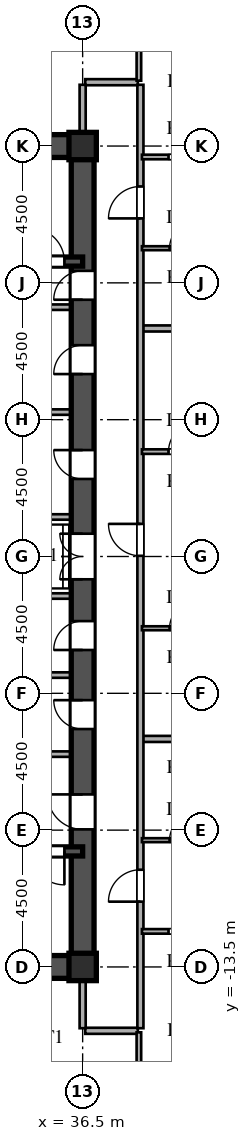
"""IFC4 building model, lengths in metres.
Left out: names, types, materials, properties, quantities, classifications, styles, units other than length and angle.
Written with IfcOpenShell. Run it as: python <this file> out.ifc"""

import sys

from ifc_helpers import new_model, si_unit, direction, frame, frame_2d, origin, origin_2d, place, context, subcontext, project, spatial, rectangle, i_section, extrude, source, transform, mapped, element, fill, save


model = new_model("IFC4")
c1 = context("Model", 3, precision=1e-05, world=origin(), true_north=direction((0.0, 1.0)))
c2 = subcontext(c1, "Body", "Model", "MODEL_VIEW")
j1 = project(units=[si_unit("LENGTHUNIT", "METRE"), si_unit("PLANEANGLEUNIT", "RADIAN")], contexts=[c1])
p1 = place(None, origin())
s1 = spatial("IfcSite", under=j1, at=p1, CompositionType="ELEMENT")
p2 = place(p1, origin())
s2 = spatial("IfcBuilding", under=s1, at=p2, CompositionType="ELEMENT")
p3 = place(p2, frame((0.0, 0.0, 29.7)))
s3 = spatial("IfcBuildingStorey", under=s2, at=p3, CompositionType="ELEMENT", Elevation=29.7)
m1 = source(origin(), c2, "Body", "SweptSolid", [
    extrude(i_section(OverallWidth=0.9, OverallDepth=0.9, WebThickness=0.036, FlangeThickness=0.055, at=origin_2d()), origin(), (0.0, 0.0, 1.0), 3.6),
])
for number, where, z_axis, x_axis in (
    (1, (36.5, -13.5, 0.0), (0.0, 0.0, 1.0), (1.0, 0.0, 0.0)),
    (2, (36.5, 13.5, 0.0), (0.0, 0.0, 1.0), (1.0, 0.0, 0.0)),
):
    element("IfcColumn", number, at=place(p3, frame(where, z_axis=z_axis, x_axis=x_axis)), inside=s3, PredefinedType="COLUMN", context=c2, shape_type="MappedRepresentation", body=[
        mapped(m1, transform((0.0, 0.0, 0.0), scale=1.0)),
    ])
for number, where, z_axis, x_axis in (
    (3, (27.5, -13.5, 0.0), (0.0, 0.0, 1.0), (1.0, 0.0, 0.0)),
    (4, (27.5, 13.5, 0.0), (0.0, 0.0, 1.0), (1.0, 0.0, 0.0)),
):
    element("IfcWall", number, at=place(p3, frame(where, z_axis=z_axis, x_axis=x_axis)), inside=s3, PredefinedType="SHEAR", context=c2, shape_type="SweptSolid", body=[
        extrude(rectangle(XDim=9.0, YDim=0.75, at=frame_2d((4.5, 0.0))), origin(), (0.0, 0.0, 1.0), 3.38),
    ])
p4 = place(p3, frame((36.5, -13.65, 0.0), z_axis=(0.0, 0.0, 1.0), x_axis=(0.0, 1.0, 0.0)))
e5 = element("IfcWall", 5, at=p4, inside=s3, PredefinedType="SHEAR", context=c2, shape_type="SweptSolid", body=[
    extrude(rectangle(XDim=7.15, YDim=0.75, at=frame_2d((3.575, 0.0))), origin(), (0.0, 0.0, 1.0), 3.38),
])
p5 = place(p4, frame((4.675, 0.0, 0.0)))
e6 = element("IfcOpeningElement", 6, at=p5, cuts=e5, PredefinedType="OPENING", context=c2, shape_type="SweptSolid", body=[
    extrude(rectangle(XDim=1.15, YDim=2.2, at=frame_2d((0.575, 1.1))), frame((0.0, 0.385, 0.0), z_axis=(0.0, -1.0, 0.0), x_axis=(1.0, 0.0, 0.0)), (0.0, 0.0, 1.0), 0.77),
])
p6 = place(p3, frame((36.5, -1.3, 0.0), z_axis=(0.0, 0.0, 1.0), x_axis=(0.0, 1.0, 0.0)))
e7 = element("IfcWall", 7, at=p6, inside=s3, PredefinedType="SHEAR", context=c2, shape_type="SweptSolid", body=[
    extrude(rectangle(XDim=2.6, YDim=0.75, at=frame_2d((1.3, 0.0))), origin(), (0.0, 0.0, 1.0), 3.38),
])
p7 = place(p6, frame((0.55, 0.0, 0.0)))
e8 = element("IfcOpeningElement", 8, at=p7, cuts=e7, PredefinedType="OPENING", context=c2, shape_type="SweptSolid", body=[
    extrude(rectangle(XDim=1.5, YDim=2.3, at=frame_2d((0.75, 1.15))), frame((0.0, 0.385, 0.0), z_axis=(0.0, -1.0, 0.0), x_axis=(1.0, 0.0, 0.0)), (0.0, 0.0, 1.0), 0.77),
])
p8 = place(p3, frame((36.5, 8.2, 0.0), z_axis=(0.0, 0.0, 1.0), x_axis=(0.0, 1.0, 0.0)))
e9 = element("IfcWall", 9, at=p8, inside=s3, PredefinedType="SHEAR", context=c2, shape_type="SweptSolid", body=[
    extrude(rectangle(XDim=5.45, YDim=0.75, at=frame_2d((2.725, 0.0))), origin(), (0.0, 0.0, 1.0), 3.38),
])
p9 = place(p8, frame((0.245, 0.0, 0.0)))
e10 = element("IfcOpeningElement", 10, at=p9, cuts=e9, PredefinedType="OPENING", context=c2, shape_type="SweptSolid", body=[
    extrude(rectangle(XDim=0.95, YDim=2.15, at=frame_2d((0.475, 1.075))), frame((0.0, 0.385, 0.0), z_axis=(0.0, -1.0, 0.0), x_axis=(1.0, 0.0, 0.0)), (0.0, 0.0, 1.0), 0.77),
])
p10 = place(p3, frame((36.5, -6.5, 0.0), z_axis=(0.0, 0.0, 1.0), x_axis=(0.0, 1.0, 0.0)))
e11 = element("IfcWall", 11, at=p10, inside=s3, PredefinedType="SHEAR", context=c2, shape_type="SweptSolid", body=[
    extrude(rectangle(XDim=2.6, YDim=0.75, at=frame_2d((1.3, 0.0))), origin(), (0.0, 0.0, 1.0), 3.38),
])
p11 = place(p10, frame((0.825, 0.0, 0.0)))
e12 = element("IfcOpeningElement", 12, at=p11, cuts=e11, PredefinedType="OPENING", context=c2, shape_type="SweptSolid", body=[
    extrude(rectangle(XDim=0.95, YDim=2.15, at=frame_2d((0.475, 1.075))), frame((0.0, 0.385, 0.0), z_axis=(0.0, -1.0, 0.0), x_axis=(1.0, 0.0, 0.0)), (0.0, 0.0, 1.0), 0.77),
])
p12 = place(p3, frame((36.5, -3.9, 0.0), z_axis=(0.0, 0.0, 1.0), x_axis=(0.0, 1.0, 0.0)))
e13 = element("IfcWall", 13, at=p12, inside=s3, PredefinedType="SHEAR", context=c2, shape_type="SweptSolid", body=[
    extrude(rectangle(XDim=2.6, YDim=0.75, at=frame_2d((1.3, 0.0))), origin(), (0.0, 0.0, 1.0), 3.38),
])
p13 = place(p12, frame((0.825, 0.0, 0.0)))
e14 = element("IfcOpeningElement", 14, at=p13, cuts=e13, PredefinedType="OPENING", context=c2, shape_type="SweptSolid", body=[
    extrude(rectangle(XDim=0.95, YDim=2.15, at=frame_2d((0.475, 1.075))), frame((0.0, 0.385, 0.0), z_axis=(0.0, -1.0, 0.0), x_axis=(1.0, 0.0, 0.0)), (0.0, 0.0, 1.0), 0.77),
])
p14 = place(p3, frame((36.5, 1.3, 0.0), z_axis=(0.0, 0.0, 1.0), x_axis=(0.0, 1.0, 0.0)))
e15 = element("IfcWall", 15, at=p14, inside=s3, PredefinedType="SHEAR", context=c2, shape_type="SweptSolid", body=[
    extrude(rectangle(XDim=3.45, YDim=0.75, at=frame_2d((1.725, 0.0))), origin(), (0.0, 0.0, 1.0), 3.38),
])
p15 = place(p14, frame((1.25, 0.0, 0.0)))
e16 = element("IfcOpeningElement", 16, at=p15, cuts=e15, PredefinedType="OPENING", context=c2, shape_type="SweptSolid", body=[
    extrude(rectangle(XDim=0.95, YDim=2.15, at=frame_2d((0.475, 1.075))), frame((0.0, 0.385, 0.0), z_axis=(0.0, -1.0, 0.0), x_axis=(1.0, 0.0, 0.0)), (0.0, 0.0, 1.0), 0.77),
])
p16 = place(p3, frame((36.5, 4.75, 0.0), z_axis=(0.0, 0.0, 1.0), x_axis=(0.0, 1.0, 0.0)))
e17 = element("IfcWall", 17, at=p16, inside=s3, PredefinedType="SHEAR", context=c2, shape_type="SweptSolid", body=[
    extrude(rectangle(XDim=3.45, YDim=0.75, at=frame_2d((1.725, 0.0))), origin(), (0.0, 0.0, 1.0), 3.38),
])
p17 = place(p16, frame((1.25, 0.0, 0.0)))
e18 = element("IfcOpeningElement", 18, at=p17, cuts=e17, PredefinedType="OPENING", context=c2, shape_type="SweptSolid", body=[
    extrude(rectangle(XDim=0.95, YDim=2.15, at=frame_2d((0.475, 1.075))), frame((0.0, 0.385, 0.0), z_axis=(0.0, -1.0, 0.0), x_axis=(1.0, 0.0, 0.0)), (0.0, 0.0, 1.0), 0.77),
])
p18 = place(p3, frame((27.5, -9.7, 0.0), z_axis=(0.0, 0.0, 1.0), x_axis=(1.0, 0.0, 0.0)))
e19 = element("IfcWall", 19, at=p18, inside=s3, PredefinedType="SHEAR", context=c2, shape_type="SweptSolid", body=[
    extrude(rectangle(XDim=9.0, YDim=0.3, at=frame_2d((4.5, 0.0))), origin(), (0.0, 0.0, 1.0), 3.38),
])
p19 = place(p18, frame((7.3, 0.0, 0.0)))
e20 = element("IfcOpeningElement", 20, at=p19, cuts=e19, PredefinedType="OPENING", context=c2, shape_type="SweptSolid", body=[
    extrude(rectangle(XDim=1.1, YDim=2.2, at=frame_2d((0.55, 1.1))), frame((0.0, 0.16, 0.0), z_axis=(0.0, -1.0, 0.0), x_axis=(1.0, 0.0, 0.0)), (0.0, 0.0, 1.0), 0.32),
])
p20 = place(p3, frame((27.5, 9.7, 0.0), z_axis=(0.0, 0.0, 1.0), x_axis=(1.0, 0.0, 0.0)))
e21 = element("IfcWall", 21, at=p20, inside=s3, PredefinedType="SHEAR", context=c2, shape_type="SweptSolid", body=[
    extrude(rectangle(XDim=9.0, YDim=0.3, at=frame_2d((4.5, 0.0))), origin(), (0.0, 0.0, 1.0), 3.38),
])
p21 = place(p20, frame((7.3, 0.0, 0.0)))
e22 = element("IfcOpeningElement", 22, at=p21, cuts=e21, PredefinedType="OPENING", context=c2, shape_type="SweptSolid", body=[
    extrude(rectangle(XDim=1.1, YDim=2.2, at=frame_2d((0.55, 1.1))), frame((0.0, 0.16, 0.0), z_axis=(0.0, -1.0, 0.0), x_axis=(1.0, 0.0, 0.0)), (0.0, 0.0, 1.0), 0.32),
])
for number, where, z_axis, x_axis in (
    (23, (30.45, -6.5, 0.0), (0.0, 0.0, 1.0), (1.0, 0.0, 0.0)),
    (24, (30.45, 8.2, 0.0), (0.0, 0.0, 1.0), (1.0, 0.0, 0.0)),
):
    element("IfcWall", number, at=place(p3, frame(where, z_axis=z_axis, x_axis=x_axis)), inside=s3, PredefinedType="PARTITIONING", context=c2, shape_type="SweptSolid", body=[
        extrude(rectangle(XDim=5.7, YDim=0.18, at=frame_2d((2.85, 0.0))), origin(), (0.0, 0.0, 1.0), 3.38),
    ])
for number, where, z_axis, x_axis in (
    (25, (33.2, -1.3, 0.0), (0.0, 0.0, 1.0), (1.0, 0.0, 0.0)),
    (26, (33.2, 1.3, 0.0), (0.0, 0.0, 1.0), (1.0, 0.0, 0.0)),
    (27, (33.2, -3.9, 0.0), (0.0, 0.0, 1.0), (1.0, 0.0, 0.0)),
    (28, (33.2, 4.75, 0.0), (0.0, 0.0, 1.0), (1.0, 0.0, 0.0)),
):
    element("IfcWall", number, at=place(p3, frame(where, z_axis=z_axis, x_axis=x_axis)), inside=s3, PredefinedType="PARTITIONING", context=c2, shape_type="SweptSolid", body=[
        extrude(rectangle(XDim=2.95, YDim=0.18, at=frame_2d((1.475, 0.0))), origin(), (0.0, 0.0, 1.0), 3.38),
    ])
p22 = place(p3, frame((36.585, -15.6, 0.0), z_axis=(0.0, 0.0, 1.0), x_axis=(1.0, 0.0, 0.0)))
e29 = element("IfcWall", 29, at=p22, inside=s3, PredefinedType="PARTITIONING", context=c2, shape_type="SweptSolid", body=[
    extrude(rectangle(XDim=1.73, YDim=0.2, at=frame_2d((0.865, 0.0))), origin(), (0.0, 0.0, 1.0), 3.38),
])
p23 = place(p3, frame((38.45, -12.33, 0.0), z_axis=(0.0, 0.0, 1.0), x_axis=(1.0, 0.0, 0.0)))
e30 = element("IfcWall", 30, at=p23, inside=s3, PredefinedType="PARTITIONING", context=c2, shape_type="SweptSolid", body=[
    extrude(rectangle(XDim=2.7, YDim=0.15, at=frame_2d((1.35, 0.0))), origin(), (0.0, 0.0, 1.0), 3.38),
])
p24 = place(p23, frame((0.875, 0.0, 0.0)))
e31 = element("IfcOpeningElement", 31, at=p24, cuts=e30, PredefinedType="OPENING", context=c2, shape_type="SweptSolid", body=[
    extrude(rectangle(XDim=0.95, YDim=2.15, at=frame_2d((0.475, 1.075))), frame((0.0, 0.085, 0.0), z_axis=(0.0, -1.0, 0.0), x_axis=(1.0, 0.0, 0.0)), (0.0, 0.0, 1.0), 0.17),
])
p25 = place(p3, frame((38.45, -9.33, 0.0), z_axis=(0.0, 0.0, 1.0), x_axis=(1.0, 0.0, 0.0)))
e32 = element("IfcWall", 32, at=p25, inside=s3, PredefinedType="PARTITIONING", context=c2, shape_type="SweptSolid", body=[
    extrude(rectangle(XDim=2.7, YDim=0.13, at=frame_2d((1.35, 0.0))), origin(), (0.0, 0.0, 1.0), 3.38),
])
p26 = place(p25, frame((0.91, 0.0, 0.0)))
e33 = element("IfcOpeningElement", 33, at=p26, cuts=e32, PredefinedType="OPENING", context=c2, shape_type="SweptSolid", body=[
    extrude(rectangle(XDim=0.88, YDim=2.1, at=frame_2d((0.44, 1.05))), frame((0.0, 0.075, 0.0), z_axis=(0.0, -1.0, 0.0), x_axis=(1.0, 0.0, 0.0)), (0.0, 0.0, 1.0), 0.15),
])
p27 = place(p3, frame((38.48, -6.0, 0.0), z_axis=(0.0, 0.0, 1.0), x_axis=(1.0, 0.0, 0.0)))
e34 = element("IfcWall", 34, at=p27, inside=s3, PredefinedType="PARTITIONING", context=c2, shape_type="SweptSolid", body=[
    extrude(rectangle(XDim=34.025, YDim=0.2, at=frame_2d((17.012, 0.0))), origin(), (0.0, 0.0, 1.0), 3.38),
])
p28 = place(p3, frame((38.45, -2.36, 0.0), z_axis=(0.0, 0.0, 1.0), x_axis=(1.0, 0.0, 0.0)))
e35 = element("IfcWall", 35, at=p28, inside=s3, PredefinedType="PARTITIONING", context=c2, shape_type="SweptSolid", body=[
    extrude(rectangle(XDim=2.7, YDim=0.13, at=frame_2d((1.35, 0.0))), origin(), (0.0, 0.0, 1.0), 3.38),
])
p29 = place(p28, frame((0.91, 0.0, 0.0)))
e36 = element("IfcOpeningElement", 36, at=p29, cuts=e35, PredefinedType="OPENING", context=c2, shape_type="SweptSolid", body=[
    extrude(rectangle(XDim=0.88, YDim=2.1, at=frame_2d((0.44, 1.05))), frame((0.0, 0.075, 0.0), z_axis=(0.0, -1.0, 0.0), x_axis=(1.0, 0.0, 0.0)), (0.0, 0.0, 1.0), 0.15),
])
p30 = place(p3, frame((38.45, 3.45, 0.0), z_axis=(0.0, 0.0, 1.0), x_axis=(1.0, 0.0, 0.0)))
e37 = element("IfcWall", 37, at=p30, inside=s3, PredefinedType="PARTITIONING", context=c2, shape_type="SweptSolid", body=[
    extrude(rectangle(XDim=2.7, YDim=0.15, at=frame_2d((1.35, 0.0))), origin(), (0.0, 0.0, 1.0), 3.38),
])
p31 = place(p30, frame((0.875, 0.0, 0.0)))
e38 = element("IfcOpeningElement", 38, at=p31, cuts=e37, PredefinedType="OPENING", context=c2, shape_type="SweptSolid", body=[
    extrude(rectangle(XDim=0.95, YDim=2.15, at=frame_2d((0.475, 1.075))), frame((0.0, 0.085, 0.0), z_axis=(0.0, -1.0, 0.0), x_axis=(1.0, 0.0, 0.0)), (0.0, 0.0, 1.0), 0.17),
])
p32 = place(p3, frame((38.48, 7.5, 0.0), z_axis=(0.0, 0.0, 1.0), x_axis=(1.0, 0.0, 0.0)))
e39 = element("IfcWall", 39, at=p32, inside=s3, PredefinedType="PARTITIONING", context=c2, shape_type="SweptSolid", body=[
    extrude(rectangle(XDim=34.025, YDim=0.2, at=frame_2d((17.012, 0.0))), origin(), (0.0, 0.0, 1.0), 3.38),
])
p33 = place(p3, frame((38.45, 10.14, 0.0), z_axis=(0.0, 0.0, 1.0), x_axis=(1.0, 0.0, 0.0)))
e40 = element("IfcWall", 40, at=p33, inside=s3, PredefinedType="PARTITIONING", context=c2, shape_type="SweptSolid", body=[
    extrude(rectangle(XDim=2.7, YDim=0.13, at=frame_2d((1.35, 0.0))), origin(), (0.0, 0.0, 1.0), 3.38),
])
p34 = place(p33, frame((0.91, 0.0, 0.0)))
e41 = element("IfcOpeningElement", 41, at=p34, cuts=e40, PredefinedType="OPENING", context=c2, shape_type="SweptSolid", body=[
    extrude(rectangle(XDim=0.88, YDim=2.1, at=frame_2d((0.44, 1.05))), frame((0.0, 0.075, 0.0), z_axis=(0.0, -1.0, 0.0), x_axis=(1.0, 0.0, 0.0)), (0.0, 0.0, 1.0), 0.15),
])
p35 = place(p3, frame((38.45, 13.14, 0.0), z_axis=(0.0, 0.0, 1.0), x_axis=(1.0, 0.0, 0.0)))
e42 = element("IfcWall", 42, at=p35, inside=s3, PredefinedType="PARTITIONING", context=c2, shape_type="SweptSolid", body=[
    extrude(rectangle(XDim=2.7, YDim=0.15, at=frame_2d((1.35, 0.0))), origin(), (0.0, 0.0, 1.0), 3.38),
])
p36 = place(p35, frame((0.875, 0.0, 0.0)))
e43 = element("IfcOpeningElement", 43, at=p36, cuts=e42, PredefinedType="OPENING", context=c2, shape_type="SweptSolid", body=[
    extrude(rectangle(XDim=0.95, YDim=2.15, at=frame_2d((0.475, 1.075))), frame((0.0, 0.085, 0.0), z_axis=(0.0, -1.0, 0.0), x_axis=(1.0, 0.0, 0.0)), (0.0, 0.0, 1.0), 0.17),
])
p37 = place(p3, frame((36.585, 15.6, 0.0), z_axis=(0.0, 0.0, 1.0), x_axis=(1.0, 0.0, 0.0)))
e44 = element("IfcWall", 44, at=p37, inside=s3, PredefinedType="PARTITIONING", context=c2, shape_type="SweptSolid", body=[
    extrude(rectangle(XDim=1.73, YDim=0.2, at=frame_2d((0.865, 0.0))), origin(), (0.0, 0.0, 1.0), 3.38),
])
for number, where, z_axis, x_axis in (
    (45, (36.5, -15.515, 0.0), (0.0, 0.0, 1.0), (0.0, 1.0, 0.0)),
    (46, (36.5, 13.88, 0.0), (0.0, 0.0, 1.0), (0.0, 1.0, 0.0)),
):
    element("IfcWall", number, at=place(p3, frame(where, z_axis=z_axis, x_axis=x_axis)), inside=s3, PredefinedType="PARTITIONING", context=c2, shape_type="SweptSolid", body=[
        extrude(rectangle(XDim=1.635, YDim=0.2, at=frame_2d((0.817, 0.0))), origin(), (0.0, 0.0, 1.0), 2.68),
    ])
p38 = place(p3, frame((38.35, -23.858, 0.0), z_axis=(0.0, 0.0, 1.0), x_axis=(0.0, 1.0, 0.0)))
e47 = element("IfcWall", 47, at=p38, inside=s3, PredefinedType="PARTITIONING", context=c2, shape_type="SweptSolid", body=[
    extrude(rectangle(XDim=8.208, YDim=0.15, at=frame_2d((4.104, 0.0))), origin(), (0.0, 0.0, 1.0), 3.38),
])
p39 = place(p38, frame((1.347, 0.0, 0.0)))
e48 = element("IfcOpeningElement", 48, at=p39, cuts=e47, PredefinedType="OPENING", context=c2, shape_type="SweptSolid", body=[
    extrude(rectangle(XDim=0.95, YDim=2.15, at=frame_2d((0.475, 1.075))), frame((0.0, 0.085, 0.0), z_axis=(0.0, -1.0, 0.0), x_axis=(1.0, 0.0, 0.0)), (0.0, 0.0, 1.0), 0.17),
])
p40 = place(p38, frame((5.458, 0.0, 0.0)))
e49 = element("IfcOpeningElement", 49, at=p40, cuts=e47, PredefinedType="OPENING", context=c2, shape_type="SweptSolid", body=[
    extrude(rectangle(XDim=0.95, YDim=2.15, at=frame_2d((0.475, 1.075))), frame((0.0, 0.085, 0.0), z_axis=(0.0, -1.0, 0.0), x_axis=(1.0, 0.0, 0.0)), (0.0, 0.0, 1.0), 0.17),
])
p41 = place(p3, frame((38.35, 15.65, 0.0), z_axis=(0.0, 0.0, 1.0), x_axis=(0.0, 1.0, 0.0)))
e50 = element("IfcWall", 50, at=p41, inside=s3, PredefinedType="PARTITIONING", context=c2, shape_type="SweptSolid", body=[
    extrude(rectangle(XDim=8.208, YDim=0.15, at=frame_2d((4.104, 0.0))), origin(), (0.0, 0.0, 1.0), 3.38),
])
p42 = place(p41, frame((1.8, 0.0, 0.0)))
e51 = element("IfcOpeningElement", 51, at=p42, cuts=e50, PredefinedType="OPENING", context=c2, shape_type="SweptSolid", body=[
    extrude(rectangle(XDim=0.95, YDim=2.15, at=frame_2d((0.475, 1.075))), frame((0.0, 0.085, 0.0), z_axis=(0.0, -1.0, 0.0), x_axis=(1.0, 0.0, 0.0)), (0.0, 0.0, 1.0), 0.17),
])
p43 = place(p3, frame((38.4, -15.515, 0.0), z_axis=(0.0, 0.0, 1.0), x_axis=(0.0, 1.0, 0.0)))
e52 = element("IfcWall", 52, at=p43, inside=s3, PredefinedType="PARTITIONING", context=c2, shape_type="SweptSolid", body=[
    extrude(rectangle(XDim=31.03, YDim=0.2, at=frame_2d((15.515, 0.0))), origin(), (0.0, 0.0, 1.0), 3.38),
])
p44 = place(p43, frame((4.163, 0.0, 0.0)))
e53 = element("IfcOpeningElement", 53, at=p44, cuts=e52, PredefinedType="OPENING", context=c2, shape_type="SweptSolid", body=[
    extrude(rectangle(XDim=1.05, YDim=2.25, at=frame_2d((0.525, 1.125))), frame((0.0, 0.11, 0.0), z_axis=(0.0, -1.0, 0.0), x_axis=(1.0, 0.0, 0.0)), (0.0, 0.0, 1.0), 0.22),
])
p45 = place(p43, frame((15.538, 0.0, 0.0)))
e54 = element("IfcOpeningElement", 54, at=p45, cuts=e52, PredefinedType="OPENING", context=c2, shape_type="SweptSolid", body=[
    extrude(rectangle(XDim=1.05, YDim=2.25, at=frame_2d((0.525, 1.125))), frame((0.0, 0.11, 0.0), z_axis=(0.0, -1.0, 0.0), x_axis=(1.0, 0.0, 0.0)), (0.0, 0.0, 1.0), 0.22),
])
p46 = place(p43, frame((26.635, 0.0, 0.0)))
e55 = element("IfcOpeningElement", 55, at=p46, cuts=e52, PredefinedType="OPENING", context=c2, shape_type="SweptSolid", body=[
    extrude(rectangle(XDim=1.05, YDim=2.25, at=frame_2d((0.525, 1.125))), frame((0.0, 0.11, 0.0), z_axis=(0.0, -1.0, 0.0), x_axis=(1.0, 0.0, 0.0)), (0.0, 0.0, 1.0), 0.22),
])
m2 = source(origin(), c2, "Body", "SweptSolid", [
    extrude(rectangle(XDim=1.15, YDim=2.2, at=frame_2d((0.575, 1.1))), frame((0.0, 0.025, 0.0), z_axis=(0.0, -1.0, 0.0), x_axis=(1.0, 0.0, 0.0)), (0.0, 0.0, 1.0), 0.05),
])
p47 = place(p5, origin())
e56 = element("IfcDoor", 56, at=p47, inside=s3, OperationType="SINGLE_SWING_RIGHT", PredefinedType="DOOR", context=c2, shape_type="MappedRepresentation", body=[
    mapped(m2, transform((0.0, 0.0, 0.0), scale=1.0)),
])
fill(e6, e56)
m3 = source(origin(), c2, "Body", "SweptSolid", [
    extrude(rectangle(XDim=1.5, YDim=2.3, at=frame_2d((0.75, 1.15))), frame((0.0, 0.025, 0.0), z_axis=(0.0, -1.0, 0.0), x_axis=(1.0, 0.0, 0.0)), (0.0, 0.0, 1.0), 0.05),
])
p48 = place(p7, origin())
e57 = element("IfcDoor", 57, at=p48, inside=s3, OperationType="DOUBLE_SWING_LEFT", PredefinedType="DOOR", context=c2, shape_type="MappedRepresentation", body=[
    mapped(m3, transform((0.0, 0.0, 0.0), scale=1.0)),
])
fill(e8, e57)
m4 = source(origin(), c2, "Body", "SweptSolid", [
    extrude(rectangle(XDim=0.95, YDim=2.15, at=frame_2d((0.475, 1.075))), frame((0.0, 0.025, 0.0), z_axis=(0.0, -1.0, 0.0), x_axis=(1.0, 0.0, 0.0)), (0.0, 0.0, 1.0), 0.05),
])
p49 = place(p9, origin())
e58 = element("IfcDoor", 58, at=p49, inside=s3, OperationType="SINGLE_SWING_LEFT", PredefinedType="DOOR", context=c2, shape_type="MappedRepresentation", body=[
    mapped(m4, transform((0.0, 0.0, 0.0), scale=1.0)),
])
fill(e10, e58)
p50 = place(p11, origin())
e59 = element("IfcDoor", 59, at=p50, inside=s3, OperationType="SINGLE_SWING_RIGHT", PredefinedType="DOOR", context=c2, shape_type="MappedRepresentation", body=[
    mapped(m4, transform((0.0, 0.0, 0.0), scale=1.0)),
])
fill(e12, e59)
p51 = place(p13, origin())
e60 = element("IfcDoor", 60, at=p51, inside=s3, OperationType="SINGLE_SWING_LEFT", PredefinedType="DOOR", context=c2, shape_type="MappedRepresentation", body=[
    mapped(m4, transform((0.0, 0.0, 0.0), scale=1.0)),
])
fill(e14, e60)
p52 = place(p15, origin())
e61 = element("IfcDoor", 61, at=p52, inside=s3, OperationType="SINGLE_SWING_RIGHT", PredefinedType="DOOR", context=c2, shape_type="MappedRepresentation", body=[
    mapped(m4, transform((0.0, 0.0, 0.0), scale=1.0)),
])
fill(e16, e61)
p53 = place(p17, origin())
e62 = element("IfcDoor", 62, at=p53, inside=s3, OperationType="SINGLE_SWING_LEFT", PredefinedType="DOOR", context=c2, shape_type="MappedRepresentation", body=[
    mapped(m4, transform((0.0, 0.0, 0.0), scale=1.0)),
])
fill(e18, e62)
m5 = source(origin(), c2, "Body", "SweptSolid", [
    extrude(rectangle(XDim=1.1, YDim=2.2, at=frame_2d((0.55, 1.1))), frame((0.0, 0.025, 0.0), z_axis=(0.0, -1.0, 0.0), x_axis=(1.0, 0.0, 0.0)), (0.0, 0.0, 1.0), 0.05),
])
p54 = place(p19, frame((1.1, 0.0, 0.0), z_axis=(0.0, 0.0, 1.0), x_axis=(-1.0, 0.0, 0.0)))
e63 = element("IfcDoor", 63, at=p54, inside=s3, OperationType="SINGLE_SWING_RIGHT", PredefinedType="DOOR", context=c2, shape_type="MappedRepresentation", body=[
    mapped(m5, transform((0.0, 0.0, 0.0), scale=1.0)),
])
fill(e20, e63)
p55 = place(p21, origin())
e64 = element("IfcDoor", 64, at=p55, inside=s3, OperationType="SINGLE_SWING_LEFT", PredefinedType="DOOR", context=c2, shape_type="MappedRepresentation", body=[
    mapped(m5, transform((0.0, 0.0, 0.0), scale=1.0)),
])
fill(e22, e64)
m6 = source(origin(), c2, "Body", "SweptSolid", [
    extrude(rectangle(XDim=0.88, YDim=2.1, at=frame_2d((0.44, 1.05))), frame((0.0, 0.025, 0.0), z_axis=(0.0, -1.0, 0.0), x_axis=(1.0, 0.0, 0.0)), (0.0, 0.0, 1.0), 0.05),
])
p56 = place(p26, origin())
e65 = element("IfcDoor", 65, at=p56, inside=s3, OperationType="SINGLE_SWING_RIGHT", PredefinedType="DOOR", context=c2, shape_type="MappedRepresentation", body=[
    mapped(m6, transform((0.0, 0.0, 0.0), scale=1.0)),
])
fill(e33, e65)
p57 = place(p29, origin())
e66 = element("IfcDoor", 66, at=p57, inside=s3, OperationType="SINGLE_SWING_RIGHT", PredefinedType="DOOR", context=c2, shape_type="MappedRepresentation", body=[
    mapped(m6, transform((0.0, 0.0, 0.0), scale=1.0)),
])
fill(e36, e66)
m7 = source(origin(), c2, "Body", "SweptSolid", [
    extrude(rectangle(XDim=0.95, YDim=2.15, at=frame_2d((0.475, 1.075))), frame((0.0, 0.025, 0.0), z_axis=(0.0, -1.0, 0.0), x_axis=(1.0, 0.0, 0.0)), (0.0, 0.0, 1.0), 0.05),
])
p58 = place(p31, origin())
e67 = element("IfcDoor", 67, at=p58, inside=s3, OperationType="SINGLE_SWING_RIGHT", PredefinedType="DOOR", context=c2, shape_type="MappedRepresentation", body=[
    mapped(m7, transform((0.0, 0.0, 0.0), scale=1.0)),
])
fill(e38, e67)
p59 = place(p34, origin())
e68 = element("IfcDoor", 68, at=p59, inside=s3, OperationType="SINGLE_SWING_RIGHT", PredefinedType="DOOR", context=c2, shape_type="MappedRepresentation", body=[
    mapped(m6, transform((0.0, 0.0, 0.0), scale=1.0)),
])
fill(e41, e68)
m8 = source(origin(), c2, "Body", "SweptSolid", [
    extrude(rectangle(XDim=1.05, YDim=2.25, at=frame_2d((0.525, 1.125))), frame((0.0, 0.025, 0.0), z_axis=(0.0, -1.0, 0.0), x_axis=(1.0, 0.0, 0.0)), (0.0, 0.0, 1.0), 0.05),
])
p60 = place(p44, origin())
e69 = element("IfcDoor", 69, at=p60, inside=s3, OperationType="SINGLE_SWING_LEFT", PredefinedType="DOOR", context=c2, shape_type="MappedRepresentation", body=[
    mapped(m8, transform((0.0, 0.0, 0.0), scale=1.0)),
])
fill(e53, e69)
p61 = place(p45, origin())
e70 = element("IfcDoor", 70, at=p61, inside=s3, OperationType="SINGLE_SWING_RIGHT", PredefinedType="DOOR", context=c2, shape_type="MappedRepresentation", body=[
    mapped(m8, transform((0.0, 0.0, 0.0), scale=1.0)),
])
fill(e54, e70)
p62 = place(p46, origin())
e71 = element("IfcDoor", 71, at=p62, inside=s3, OperationType="SINGLE_SWING_LEFT", PredefinedType="DOOR", context=c2, shape_type="MappedRepresentation", body=[
    mapped(m8, transform((0.0, 0.0, 0.0), scale=1.0)),
])
fill(e55, e71)
save(model, sys.argv[1])
